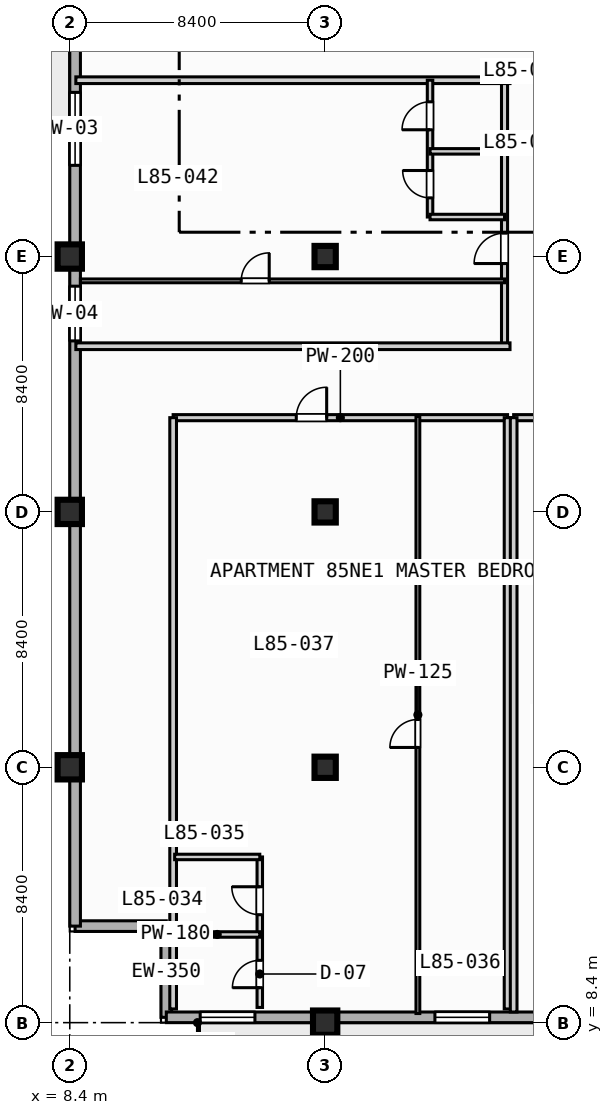
"""IFC4 building model, lengths in metres.
Left out: names, types, materials, properties, quantities, classifications, styles, units other than length and angle.
Written with IfcOpenShell. Run it as: python <this file> out.ifc"""

import sys

from ifc_helpers import new_model, si_unit, direction, frame, frame_2d, origin, origin_2d, place, context, subcontext, project, spatial, rectangle, extrude, element, fill, save


model = new_model("IFC4")
c1 = context("Model", 3, precision=1e-05, world=origin(), true_north=direction((0.0, 1.0)))
c2 = subcontext(c1, "Body", "Model", "MODEL_VIEW")
j1 = project(units=[si_unit("LENGTHUNIT", "METRE"), si_unit("PLANEANGLEUNIT", "RADIAN")], contexts=[c1])
p1 = place(None, origin())
s1 = spatial("IfcSite", under=j1, at=p1, CompositionType="ELEMENT")
p2 = place(p1, origin())
s2 = spatial("IfcBuilding", under=s1, at=p2, CompositionType="ELEMENT")
p3 = place(p2, frame((0.0, 0.0, 343.7)))
s3 = spatial("IfcBuildingStorey", under=s2, at=p3, CompositionType="ELEMENT", Elevation=343.7)
for number, where, z_axis, x_axis in (
    (1, (8.4, 16.8, 0.0), (0.0, 0.0, 1.0), (1.0, 0.0, 0.0)),
    (2, (8.4, 25.2, 0.0), (0.0, 0.0, 1.0), (1.0, 0.0, 0.0)),
    (3, (8.4, 33.6, 0.0), (0.0, 0.0, 1.0), (1.0, 0.0, 0.0)),
    (4, (16.8, 8.4, 0.0), (0.0, 0.0, 1.0), (1.0, 0.0, 0.0)),
):
    element("IfcColumn", number, at=place(p3, frame(where, z_axis=z_axis, x_axis=x_axis)), inside=s3, PredefinedType="COLUMN", context=c2, shape_type="SweptSolid", body=[
        extrude(rectangle(XDim=0.8, YDim=0.8, at=origin_2d()), origin(), (0.0, 0.0, 1.0), 3.9),
    ])
for number, where, z_axis, x_axis in (
    (5, (16.8, 16.8, 0.0), (0.0, 0.0, 1.0), (1.0, 0.0, 0.0)),
    (6, (16.8, 25.2, 0.0), (0.0, 0.0, 1.0), (1.0, 0.0, 0.0)),
    (7, (16.8, 33.6, 0.0), (0.0, 0.0, 1.0), (1.0, 0.0, 0.0)),
):
    element("IfcColumn", number, at=place(p3, frame(where, z_axis=z_axis, x_axis=x_axis)), inside=s3, PredefinedType="COLUMN", context=c2, shape_type="SweptSolid", body=[
        extrude(rectangle(XDim=0.7, YDim=0.7, at=origin_2d()), origin(), (0.0, 0.0, 1.0), 3.9),
    ])
for number, where, z_axis, x_axis in (
    (8, (11.575, 8.575, 0.0), (0.0, 0.0, 1.0), (0.0, 1.0, 0.0)),
    (9, (11.575, 11.575, 0.0), (0.0, 0.0, 1.0), (-1.0, 0.0, 0.0)),
):
    element("IfcWall", number, at=place(p3, frame(where, z_axis=z_axis, x_axis=x_axis)), inside=s3, PredefinedType="STANDARD", context=c2, shape_type="SweptSolid", body=[
        extrude(rectangle(XDim=3.0, YDim=0.35, at=frame_2d((1.5, 0.0))), origin(), (0.0, 0.0, 1.0), 3.67),
    ])
p4 = place(p3, frame((8.575, 11.575, 0.0), z_axis=(0.0, 0.0, 1.0), x_axis=(0.0, 1.0, 0.0)))
e10 = element("IfcWall", 10, at=p4, inside=s3, PredefinedType="STANDARD", context=c2, shape_type="SweptSolid", body=[
    extrude(rectangle(XDim=60.85, YDim=0.35, at=frame_2d((30.425, 0.0))), origin(), (0.0, 0.0, 1.0), 3.67),
])
p5 = place(p4, frame((33.925, 0.0, 0.0)))
e11 = element("IfcOpeningElement", 11, at=p5, cuts=e10, PredefinedType="OPENING", context=c2, shape_type="SweptSolid", body=[
    extrude(rectangle(XDim=1.4, YDim=2.2, at=frame_2d((0.7, 1.1))), frame((0.0, 0.185, 0.0), z_axis=(0.0, -1.0, 0.0), x_axis=(1.0, 0.0, 0.0)), (0.0, 0.0, 1.0), 0.37),
])
p6 = place(p4, frame((25.025, 0.0, 0.85)))
e12 = element("IfcOpeningElement", 12, at=p6, cuts=e10, PredefinedType="OPENING", context=c2, shape_type="SweptSolid", body=[
    extrude(rectangle(XDim=2.4, YDim=1.95, at=frame_2d((1.2, 0.975))), frame((0.0, 0.185, 0.0), z_axis=(0.0, -1.0, 0.0), x_axis=(1.0, 0.0, 0.0)), (0.0, 0.0, 1.0), 0.37),
])
p7 = place(p4, frame((41.825, 0.0, 0.85)))
e13 = element("IfcOpeningElement", 13, at=p7, cuts=e10, PredefinedType="OPENING", context=c2, shape_type="SweptSolid", body=[
    extrude(rectangle(XDim=2.4, YDim=1.95, at=frame_2d((1.2, 0.975))), frame((0.0, 0.185, 0.0), z_axis=(0.0, -1.0, 0.0), x_axis=(1.0, 0.0, 0.0)), (0.0, 0.0, 1.0), 0.37),
])
p8 = place(p4, frame((19.25, 0.0, 0.85)))
e14 = element("IfcOpeningElement", 14, at=p8, cuts=e10, PredefinedType="OPENING", context=c2, shape_type="SweptSolid", body=[
    extrude(rectangle(XDim=1.8, YDim=1.8, at=frame_2d((0.9, 0.9))), frame((0.0, 0.185, 0.0), z_axis=(0.0, -1.0, 0.0), x_axis=(1.0, 0.0, 0.0)), (0.0, 0.0, 1.0), 0.37),
])
p9 = place(p3, frame((64.025, 8.575, 0.0), z_axis=(0.0, 0.0, 1.0), x_axis=(-1.0, 0.0, 0.0)))
e15 = element("IfcWall", 15, at=p9, inside=s3, PredefinedType="STANDARD", context=c2, shape_type="SweptSolid", body=[
    extrude(rectangle(XDim=52.45, YDim=0.35, at=frame_2d((26.225, 0.0))), origin(), (0.0, 0.0, 1.0), 3.67),
])
p10 = place(p9, frame((33.925, 0.0, 0.0)))
e16 = element("IfcOpeningElement", 16, at=p10, cuts=e15, PredefinedType="OPENING", context=c2, shape_type="SweptSolid", body=[
    extrude(rectangle(XDim=1.4, YDim=2.2, at=frame_2d((0.7, 1.1))), frame((0.0, 0.185, 0.0), z_axis=(0.0, -1.0, 0.0), x_axis=(1.0, 0.0, 0.0)), (0.0, 0.0, 1.0), 0.37),
])
p11 = place(p9, frame((25.025, 0.0, 0.85)))
e17 = element("IfcOpeningElement", 17, at=p11, cuts=e15, PredefinedType="OPENING", context=c2, shape_type="SweptSolid", body=[
    extrude(rectangle(XDim=2.4, YDim=1.95, at=frame_2d((1.2, 0.975))), frame((0.0, 0.185, 0.0), z_axis=(0.0, -1.0, 0.0), x_axis=(1.0, 0.0, 0.0)), (0.0, 0.0, 1.0), 0.37),
])
p12 = place(p9, frame((16.925, 0.0, 0.85)))
e18 = element("IfcOpeningElement", 18, at=p12, cuts=e15, PredefinedType="OPENING", context=c2, shape_type="SweptSolid", body=[
    extrude(rectangle(XDim=1.8, YDim=1.8, at=frame_2d((0.9, 0.9))), frame((0.0, 0.185, 0.0), z_axis=(0.0, -1.0, 0.0), x_axis=(1.0, 0.0, 0.0)), (0.0, 0.0, 1.0), 0.37),
])
p13 = place(p9, frame((41.815, 0.0, 0.85)))
e19 = element("IfcOpeningElement", 19, at=p13, cuts=e15, PredefinedType="OPENING", context=c2, shape_type="SweptSolid", body=[
    extrude(rectangle(XDim=1.8, YDim=1.8, at=frame_2d((0.9, 0.9))), frame((0.0, 0.185, 0.0), z_axis=(0.0, -1.0, 0.0), x_axis=(1.0, 0.0, 0.0)), (0.0, 0.0, 1.0), 0.37),
])
p14 = place(p9, frame((49.535, 0.0, 0.85)))
e20 = element("IfcOpeningElement", 20, at=p14, cuts=e15, PredefinedType="OPENING", context=c2, shape_type="SweptSolid", body=[
    extrude(rectangle(XDim=1.8, YDim=1.8, at=frame_2d((0.9, 0.9))), frame((0.0, 0.185, 0.0), z_axis=(0.0, -1.0, 0.0), x_axis=(1.0, 0.0, 0.0)), (0.0, 0.0, 1.0), 0.37),
])
p15 = place(p3, frame((11.8, 28.3, 0.0), z_axis=(0.0, 0.0, 1.0), x_axis=(1.0, 0.0, 0.0)))
e21 = element("IfcWall", 21, at=p15, inside=s3, PredefinedType="PARTITIONING", context=c2, shape_type="SweptSolid", body=[
    extrude(rectangle(XDim=11.0, YDim=0.2, at=frame_2d((5.5, 0.0))), origin(), (0.0, 0.0, 1.0), 3.67),
])
p16 = place(p15, frame((4.05, 0.0, 0.0)))
e22 = element("IfcOpeningElement", 22, at=p16, cuts=e21, PredefinedType="OPENING", context=c2, shape_type="SweptSolid", body=[
    extrude(rectangle(XDim=1.0, YDim=2.15, at=frame_2d((0.5, 1.075))), frame((0.0, 0.11, 0.0), z_axis=(0.0, -1.0, 0.0), x_axis=(1.0, 0.0, 0.0)), (0.0, 0.0, 1.0), 0.22),
])
for number, where, z_axis, x_axis in (
    (23, (22.8, 8.85, 0.0), (0.0, 0.0, 1.0), (0.0, 1.0, 0.0)),
    (24, (11.8, 8.85, 0.0), (0.0, 0.0, 1.0), (0.0, 1.0, 0.0)),
):
    element("IfcWall", number, at=place(p3, frame(where, z_axis=z_axis, x_axis=x_axis)), inside=s3, PredefinedType="PARTITIONING", context=c2, shape_type="SweptSolid", body=[
        extrude(rectangle(XDim=19.45, YDim=0.22, at=frame_2d((9.725, 0.0))), origin(), (0.0, 0.0, 1.0), 3.67),
    ])
p17 = place(p3, frame((14.65, 8.9, 0.0), z_axis=(0.0, 0.0, 1.0), x_axis=(0.0, 1.0, 0.0)))
e25 = element("IfcWall", 25, at=p17, inside=s3, PredefinedType="PLUMBINGWALL", context=c2, shape_type="SweptSolid", body=[
    extrude(rectangle(XDim=4.95, YDim=0.18, at=frame_2d((2.475, 0.0))), origin(), (0.0, 0.0, 1.0), 3.67),
])
p18 = place(p17, frame((0.65, 0.0, 0.0)))
e26 = element("IfcOpeningElement", 26, at=p18, cuts=e25, PredefinedType="OPENING", context=c2, shape_type="SweptSolid", body=[
    extrude(rectangle(XDim=0.9, YDim=2.1, at=frame_2d((0.45, 1.05))), frame((0.0, 0.1, 0.0), z_axis=(0.0, -1.0, 0.0), x_axis=(1.0, 0.0, 0.0)), (0.0, 0.0, 1.0), 0.2),
])
p19 = place(p17, frame((3.05, 0.0, 0.0)))
e27 = element("IfcOpeningElement", 27, at=p19, cuts=e25, PredefinedType="OPENING", context=c2, shape_type="SweptSolid", body=[
    extrude(rectangle(XDim=0.92, YDim=2.1, at=frame_2d((0.46, 1.05))), frame((0.0, 0.1, 0.0), z_axis=(0.0, -1.0, 0.0), x_axis=(1.0, 0.0, 0.0)), (0.0, 0.0, 1.0), 0.2),
])
for number, where, z_axis, x_axis in (
    (28, (11.85, 11.3, 0.0), (0.0, 0.0, 1.0), (1.0, 0.0, 0.0)),
    (29, (11.85, 13.85, 0.0), (0.0, 0.0, 1.0), (1.0, 0.0, 0.0)),
):
    element("IfcWall", number, at=place(p3, frame(where, z_axis=z_axis, x_axis=x_axis)), inside=s3, PredefinedType="PLUMBINGWALL", context=c2, shape_type="SweptSolid", body=[
        extrude(rectangle(XDim=2.8, YDim=0.18, at=frame_2d((1.4, 0.0))), origin(), (0.0, 0.0, 1.0), 3.67),
    ])
p20 = place(p3, frame((19.85, 8.7, 0.0), z_axis=(0.0, 0.0, 1.0), x_axis=(0.0, 1.0, 0.0)))
e30 = element("IfcWall", 30, at=p20, inside=s3, PredefinedType="PARTITIONING", context=c2, shape_type="SweptSolid", body=[
    extrude(rectangle(XDim=19.65, YDim=0.125, at=frame_2d((9.825, 0.0))), origin(), (0.0, 0.0, 1.0), 3.67),
])
p21 = place(p20, frame((8.752, 0.0, 0.0)))
e31 = element("IfcOpeningElement", 31, at=p21, cuts=e30, PredefinedType="OPENING", context=c2, shape_type="SweptSolid", body=[
    extrude(rectangle(XDim=0.92, YDim=2.1, at=frame_2d((0.46, 1.05))), frame((0.0, 0.073, 0.0), z_axis=(0.0, -1.0, 0.0), x_axis=(1.0, 0.0, 0.0)), (0.0, 0.0, 1.0), 0.145),
])
p22 = place(p3, frame((23.0, 28.3, 0.0), z_axis=(0.0, 0.0, 1.0), x_axis=(1.0, 0.0, 0.0)))
e32 = element("IfcWall", 32, at=p22, inside=s3, PredefinedType="PARTITIONING", context=c2, shape_type="SweptSolid", body=[
    extrude(rectangle(XDim=16.2, YDim=0.2, at=frame_2d((8.1, 0.0))), origin(), (0.0, 0.0, 1.0), 3.67),
])
p23 = place(p22, frame((5.5, 0.0, 0.0)))
e33 = element("IfcOpeningElement", 33, at=p23, cuts=e32, PredefinedType="OPENING", context=c2, shape_type="SweptSolid", body=[
    extrude(rectangle(XDim=2.0, YDim=2.15, at=frame_2d((1.0, 1.075))), frame((0.0, 0.11, 0.0), z_axis=(0.0, -1.0, 0.0), x_axis=(1.0, 0.0, 0.0)), (0.0, 0.0, 1.0), 0.22),
])
p24 = place(p3, frame((23.0, 8.75, 0.0), z_axis=(0.0, 0.0, 1.0), x_axis=(0.0, 1.0, 0.0)))
e34 = element("IfcWall", 34, at=p24, inside=s3, PredefinedType="PARTITIONING", context=c2, shape_type="SweptSolid", body=[
    extrude(rectangle(XDim=19.55, YDim=0.22, at=frame_2d((9.775, 0.0))), origin(), (0.0, 0.0, 1.0), 3.67),
])
p25 = place(p3, frame((22.7, 30.65, 0.0), z_axis=(0.0, 0.0, 1.0), x_axis=(0.0, 1.0, 0.0)))
e35 = element("IfcWall", 35, at=p25, inside=s3, PredefinedType="PARTITIONING", context=c2, shape_type="SweptSolid", body=[
    extrude(rectangle(XDim=8.75, YDim=0.2, at=frame_2d((4.375, 0.0))), origin(), (0.0, 0.0, 1.0), 3.67),
])
p26 = place(p25, frame((2.72, 0.0, 0.0)))
e36 = element("IfcOpeningElement", 36, at=p26, cuts=e35, PredefinedType="OPENING", context=c2, shape_type="SweptSolid", body=[
    extrude(rectangle(XDim=1.0, YDim=2.15, at=frame_2d((0.5, 1.075))), frame((0.0, 0.11, 0.0), z_axis=(0.0, -1.0, 0.0), x_axis=(1.0, 0.0, 0.0)), (0.0, 0.0, 1.0), 0.22),
])
for number, where, z_axis, x_axis in (
    (37, (8.6, 30.65, 0.0), (0.0, 0.0, 1.0), (1.0, 0.0, 0.0)),
    (38, (8.6, 39.4, 0.0), (0.0, 0.0, 1.0), (1.0, 0.0, 0.0)),
):
    element("IfcWall", number, at=place(p3, frame(where, z_axis=z_axis, x_axis=x_axis)), inside=s3, PredefinedType="PARTITIONING", context=c2, shape_type="SweptSolid", body=[
        extrude(rectangle(XDim=14.28, YDim=0.22, at=frame_2d((7.14, 0.0))), origin(), (0.0, 0.0, 1.0), 3.67),
    ])
p27 = place(p3, frame((20.25, 34.9, 0.0), z_axis=(0.0, 0.0, 1.0), x_axis=(0.0, 1.0, 0.0)))
e39 = element("IfcWall", 39, at=p27, inside=s3, PredefinedType="PLUMBINGWALL", context=c2, shape_type="SweptSolid", body=[
    extrude(rectangle(XDim=4.5, YDim=0.18, at=frame_2d((2.25, 0.0))), origin(), (0.0, 0.0, 1.0), 3.67),
])
p28 = place(p27, frame((0.63, 0.0, 0.0)))
e40 = element("IfcOpeningElement", 40, at=p28, cuts=e39, PredefinedType="OPENING", context=c2, shape_type="SweptSolid", body=[
    extrude(rectangle(XDim=0.9, YDim=2.1, at=frame_2d((0.45, 1.05))), frame((0.0, 0.1, 0.0), z_axis=(0.0, -1.0, 0.0), x_axis=(1.0, 0.0, 0.0)), (0.0, 0.0, 1.0), 0.2),
])
p29 = place(p27, frame((2.87, 0.0, 0.0)))
e41 = element("IfcOpeningElement", 41, at=p29, cuts=e39, PredefinedType="OPENING", context=c2, shape_type="SweptSolid", body=[
    extrude(rectangle(XDim=0.92, YDim=2.1, at=frame_2d((0.46, 1.05))), frame((0.0, 0.1, 0.0), z_axis=(0.0, -1.0, 0.0), x_axis=(1.0, 0.0, 0.0)), (0.0, 0.0, 1.0), 0.2),
])
for number, where, z_axis, x_axis in (
    (42, (20.25, 34.9, 0.0), (0.0, 0.0, 1.0), (1.0, 0.0, 0.0)),
    (43, (20.25, 37.06, 0.0), (0.0, 0.0, 1.0), (1.0, 0.0, 0.0)),
):
    element("IfcWall", number, at=place(p3, frame(where, z_axis=z_axis, x_axis=x_axis)), inside=s3, PredefinedType="PLUMBINGWALL", context=c2, shape_type="SweptSolid", body=[
        extrude(rectangle(XDim=2.45, YDim=0.18, at=frame_2d((1.225, 0.0))), origin(), (0.0, 0.0, 1.0), 3.67),
    ])
p30 = place(p3, frame((8.75, 32.8, 0.0), z_axis=(0.0, 0.0, 1.0), x_axis=(1.0, 0.0, 0.0)))
e44 = element("IfcWall", 44, at=p30, inside=s3, PredefinedType="PARTITIONING", context=c2, shape_type="SweptSolid", body=[
    extrude(rectangle(XDim=13.95, YDim=0.125, at=frame_2d((6.975, 0.0))), origin(), (0.0, 0.0, 1.0), 3.67),
])
p31 = place(p30, frame((5.29, 0.0, 0.0)))
e45 = element("IfcOpeningElement", 45, at=p31, cuts=e44, PredefinedType="OPENING", context=c2, shape_type="SweptSolid", body=[
    extrude(rectangle(XDim=0.92, YDim=2.1, at=frame_2d((0.46, 1.05))), frame((0.0, 0.073, 0.0), z_axis=(0.0, -1.0, 0.0), x_axis=(1.0, 0.0, 0.0)), (0.0, 0.0, 1.0), 0.145),
])
p32 = place(p6, origin())
e46 = element("IfcWindow", 46, at=p32, inside=s3, PartitioningType="SINGLE_PANEL", PredefinedType="WINDOW", context=c2, shape_type="SweptSolid", body=[
    extrude(rectangle(XDim=2.4, YDim=1.95, at=frame_2d((1.2, 0.975))), frame((0.0, 0.03, 0.0), z_axis=(0.0, -1.0, 0.0), x_axis=(1.0, 0.0, 0.0)), (0.0, 0.0, 1.0), 0.06),
])
fill(e12, e46)
p33 = place(p8, origin())
e47 = element("IfcWindow", 47, at=p33, inside=s3, PartitioningType="SINGLE_PANEL", PredefinedType="WINDOW", context=c2, shape_type="SweptSolid", body=[
    extrude(rectangle(XDim=1.8, YDim=1.8, at=frame_2d((0.9, 0.9))), frame((0.0, 0.03, 0.0), z_axis=(0.0, -1.0, 0.0), x_axis=(1.0, 0.0, 0.0)), (0.0, 0.0, 1.0), 0.06),
])
fill(e14, e47)
p34 = place(p13, origin())
e48 = element("IfcWindow", 48, at=p34, inside=s3, PartitioningType="SINGLE_PANEL", PredefinedType="WINDOW", context=c2, shape_type="SweptSolid", body=[
    extrude(rectangle(XDim=1.8, YDim=1.8, at=frame_2d((0.9, 0.9))), frame((0.0, 0.03, 0.0), z_axis=(0.0, -1.0, 0.0), x_axis=(1.0, 0.0, 0.0)), (0.0, 0.0, 1.0), 0.06),
])
fill(e19, e48)
p35 = place(p14, origin())
e49 = element("IfcWindow", 49, at=p35, inside=s3, PartitioningType="SINGLE_PANEL", PredefinedType="WINDOW", context=c2, shape_type="SweptSolid", body=[
    extrude(rectangle(XDim=1.8, YDim=1.8, at=frame_2d((0.9, 0.9))), frame((0.0, 0.03, 0.0), z_axis=(0.0, -1.0, 0.0), x_axis=(1.0, 0.0, 0.0)), (0.0, 0.0, 1.0), 0.06),
])
fill(e20, e49)
p36 = place(p16, origin())
e50 = element("IfcDoor", 50, at=p36, inside=s3, OperationType="SINGLE_SWING_RIGHT", PredefinedType="DOOR", context=c2, shape_type="SweptSolid", body=[
    extrude(rectangle(XDim=1.0, YDim=2.15, at=frame_2d((0.5, 1.075))), frame((0.0, 0.025, 0.0), z_axis=(0.0, -1.0, 0.0), x_axis=(1.0, 0.0, 0.0)), (0.0, 0.0, 1.0), 0.05),
])
fill(e22, e50)
p37 = place(p18, origin())
e51 = element("IfcDoor", 51, at=p37, inside=s3, OperationType="SINGLE_SWING_LEFT", PredefinedType="DOOR", context=c2, shape_type="SweptSolid", body=[
    extrude(rectangle(XDim=0.9, YDim=2.1, at=frame_2d((0.45, 1.05))), frame((0.0, 0.025, 0.0), z_axis=(0.0, -1.0, 0.0), x_axis=(1.0, 0.0, 0.0)), (0.0, 0.0, 1.0), 0.05),
])
fill(e26, e51)
p38 = place(p19, origin())
e52 = element("IfcDoor", 52, at=p38, inside=s3, OperationType="SINGLE_SWING_RIGHT", PredefinedType="DOOR", context=c2, shape_type="SweptSolid", body=[
    extrude(rectangle(XDim=0.92, YDim=2.1, at=frame_2d((0.46, 1.05))), frame((0.0, 0.025, 0.0), z_axis=(0.0, -1.0, 0.0), x_axis=(1.0, 0.0, 0.0)), (0.0, 0.0, 1.0), 0.05),
])
fill(e27, e52)
p39 = place(p21, origin())
e53 = element("IfcDoor", 53, at=p39, inside=s3, OperationType="SINGLE_SWING_LEFT", PredefinedType="DOOR", context=c2, shape_type="SweptSolid", body=[
    extrude(rectangle(XDim=0.92, YDim=2.1, at=frame_2d((0.46, 1.05))), frame((0.0, 0.025, 0.0), z_axis=(0.0, -1.0, 0.0), x_axis=(1.0, 0.0, 0.0)), (0.0, 0.0, 1.0), 0.05),
])
fill(e31, e53)
p40 = place(p26, origin())
e54 = element("IfcDoor", 54, at=p40, inside=s3, OperationType="SINGLE_SWING_LEFT", PredefinedType="DOOR", context=c2, shape_type="SweptSolid", body=[
    extrude(rectangle(XDim=1.0, YDim=2.15, at=frame_2d((0.5, 1.075))), frame((0.0, 0.025, 0.0), z_axis=(0.0, -1.0, 0.0), x_axis=(1.0, 0.0, 0.0)), (0.0, 0.0, 1.0), 0.05),
])
fill(e36, e54)
p41 = place(p28, origin())
e55 = element("IfcDoor", 55, at=p41, inside=s3, OperationType="SINGLE_SWING_RIGHT", PredefinedType="DOOR", context=c2, shape_type="SweptSolid", body=[
    extrude(rectangle(XDim=0.9, YDim=2.1, at=frame_2d((0.45, 1.05))), frame((0.0, 0.025, 0.0), z_axis=(0.0, -1.0, 0.0), x_axis=(1.0, 0.0, 0.0)), (0.0, 0.0, 1.0), 0.05),
])
fill(e40, e55)
p42 = place(p29, origin())
e56 = element("IfcDoor", 56, at=p42, inside=s3, OperationType="SINGLE_SWING_LEFT", PredefinedType="DOOR", context=c2, shape_type="SweptSolid", body=[
    extrude(rectangle(XDim=0.92, YDim=2.1, at=frame_2d((0.46, 1.05))), frame((0.0, 0.025, 0.0), z_axis=(0.0, -1.0, 0.0), x_axis=(1.0, 0.0, 0.0)), (0.0, 0.0, 1.0), 0.05),
])
fill(e41, e56)
p43 = place(p31, origin())
e57 = element("IfcDoor", 57, at=p43, inside=s3, OperationType="SINGLE_SWING_RIGHT", PredefinedType="DOOR", context=c2, shape_type="SweptSolid", body=[
    extrude(rectangle(XDim=0.92, YDim=2.1, at=frame_2d((0.46, 1.05))), frame((0.0, 0.025, 0.0), z_axis=(0.0, -1.0, 0.0), x_axis=(1.0, 0.0, 0.0)), (0.0, 0.0, 1.0), 0.05),
])
fill(e45, e57)
save(model, sys.argv[1])
